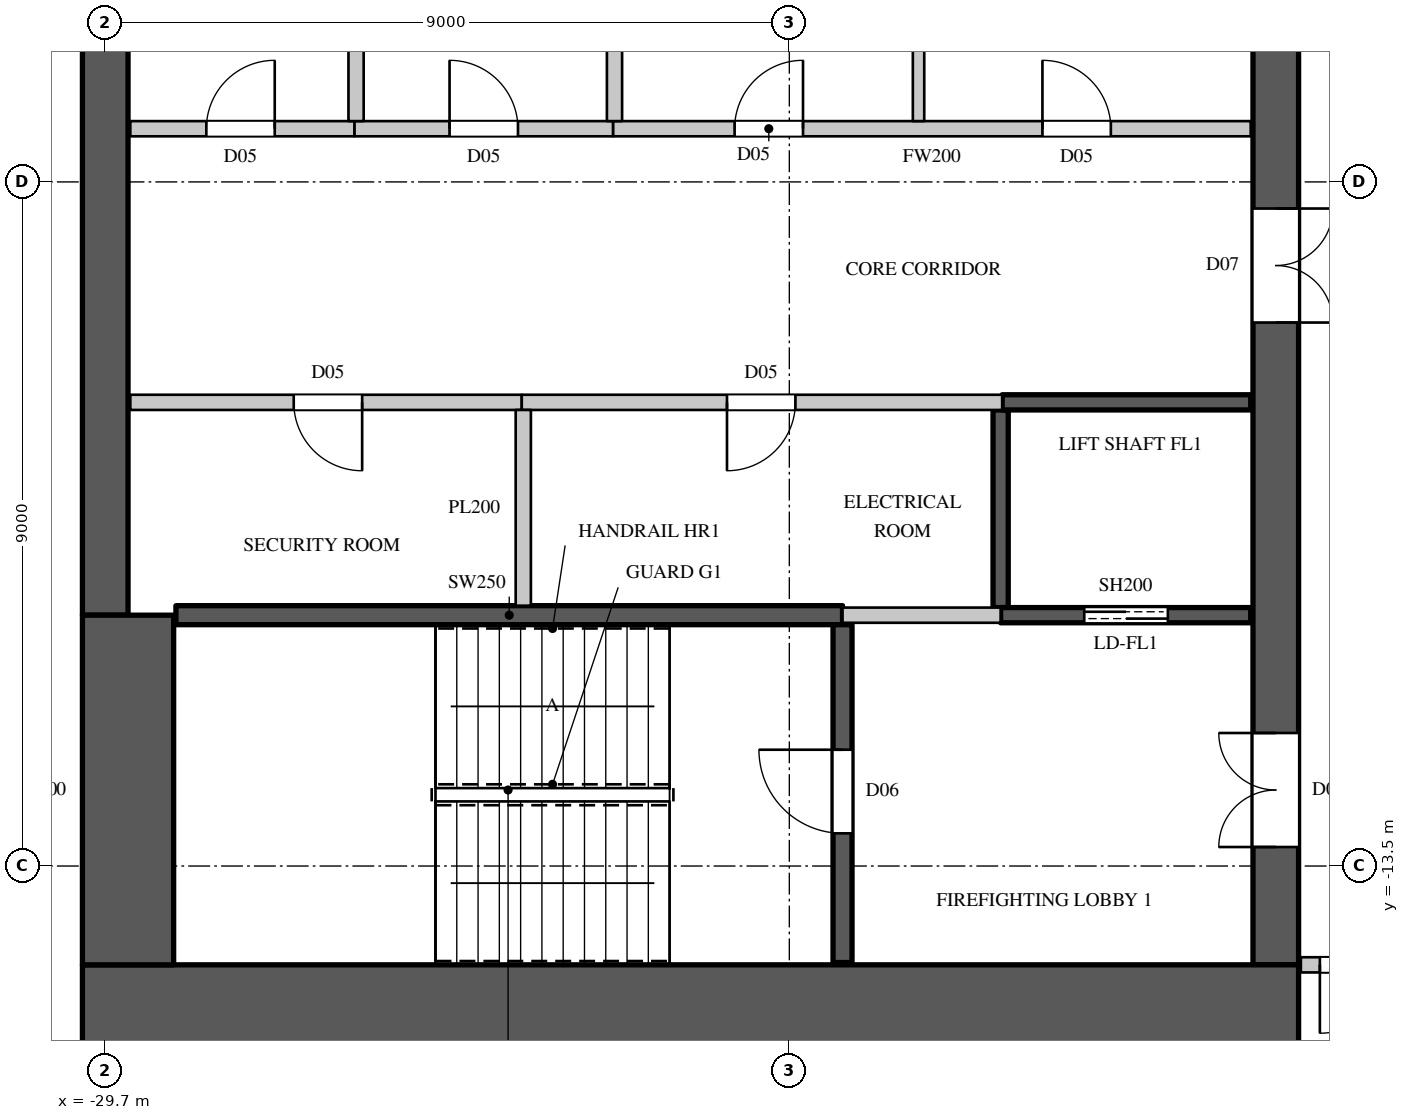
"""IFC4 building model, lengths in metres.
Left out: names, types, materials, properties, quantities, classifications, styles, units other than length and angle.
Written with IfcOpenShell. Run it as: python <this file> out.ifc"""

import sys

from ifc_helpers import new_model, si_unit, direction, frame, frame_2d, origin, place, context, subcontext, project, spatial, rectangle, extrude, element, fill, save


model = new_model("IFC4")
c1 = context("Model", 3, precision=1e-05, world=origin(), true_north=direction((0.0, 1.0)))
c2 = subcontext(c1, "Body", "Model", "MODEL_VIEW")
j1 = project(units=[si_unit("LENGTHUNIT", "METRE"), si_unit("PLANEANGLEUNIT", "RADIAN")], contexts=[c1])
p1 = place(None, origin())
s1 = spatial("IfcSite", under=j1, at=p1, CompositionType="ELEMENT")
p2 = place(p1, origin())
s2 = spatial("IfcBuilding", under=s1, at=p2, CompositionType="ELEMENT")
p3 = place(p2, frame((0.0, 0.0, 343.0)))
s3 = spatial("IfcBuildingStorey", under=s2, at=p3, CompositionType="ELEMENT", Elevation=343.0)
p4 = place(p3, frame((-30.0, -15.4, 0.0), z_axis=(0.0, 0.0, 1.0), x_axis=(1.0, 0.0, 0.0)))
e1 = element("IfcWall", 1, at=p4, inside=s3, PredefinedType="SHEAR", context=c2, shape_type="SweptSolid", body=[
    extrude(rectangle(XDim=16.0, YDim=1.2, at=frame_2d((8.0, 0.0))), origin(), (0.0, 0.0, 1.0), 4.0),
])
p5 = place(p3, frame((-14.3, -14.8, 0.0), z_axis=(0.0, 0.0, 1.0), x_axis=(0.0, 1.0, 0.0)))
e2 = element("IfcWall", 2, at=p5, inside=s3, PredefinedType="SHEAR", context=c2, shape_type="SweptSolid", body=[
    extrude(rectangle(XDim=29.6, YDim=0.6, at=frame_2d((14.8, 0.0))), origin(), (0.0, 0.0, 1.0), 4.0),
])
p6 = place(p5, frame((1.55, 0.0, 0.0)))
e3 = element("IfcOpeningElement", 3, at=p6, cuts=e2, PredefinedType="OPENING", context=c2, shape_type="SweptSolid", body=[
    extrude(rectangle(XDim=1.5, YDim=2.4, at=frame_2d((0.75, 1.2))), frame((0.0, 0.31, 0.0), z_axis=(0.0, -1.0, 0.0), x_axis=(1.0, 0.0, 0.0)), (0.0, 0.0, 1.0), 0.62),
])
p7 = place(p5, frame((26.55, 0.0, 0.0)))
e4 = element("IfcOpeningElement", 4, at=p7, cuts=e2, PredefinedType="OPENING", context=c2, shape_type="SweptSolid", body=[
    extrude(rectangle(XDim=1.5, YDim=2.4, at=frame_2d((0.75, 1.2))), frame((0.0, 0.31, 0.0), z_axis=(0.0, -1.0, 0.0), x_axis=(1.0, 0.0, 0.0)), (0.0, 0.0, 1.0), 0.62),
])
p8 = place(p5, frame((8.45, 0.0, 0.0)))
e5 = element("IfcOpeningElement", 5, at=p8, cuts=e2, PredefinedType="OPENING", context=c2, shape_type="SweptSolid", body=[
    extrude(rectangle(XDim=1.5, YDim=2.4, at=frame_2d((0.75, 1.2))), frame((0.0, 0.31, 0.0), z_axis=(0.0, -1.0, 0.0), x_axis=(1.0, 0.0, 0.0)), (0.0, 0.0, 1.0), 0.62),
])
p9 = place(p5, frame((19.65, 0.0, 0.0)))
e6 = element("IfcOpeningElement", 6, at=p9, cuts=e2, PredefinedType="OPENING", context=c2, shape_type="SweptSolid", body=[
    extrude(rectangle(XDim=1.5, YDim=2.4, at=frame_2d((0.75, 1.2))), frame((0.0, 0.31, 0.0), z_axis=(0.0, -1.0, 0.0), x_axis=(1.0, 0.0, 0.0)), (0.0, 0.0, 1.0), 0.62),
])
p10 = place(p5, frame((14.5, 0.0, 0.0)))
e7 = element("IfcOpeningElement", 7, at=p10, cuts=e2, PredefinedType="OPENING", context=c2, shape_type="SweptSolid", body=[
    extrude(rectangle(XDim=0.6, YDim=2.0, at=frame_2d((0.3, 1.0))), frame((0.0, 0.31, 0.0), z_axis=(0.0, -1.0, 0.0), x_axis=(1.0, 0.0, 0.0)), (0.0, 0.0, 1.0), 0.62),
])
p11 = place(p3, frame((-29.7, -10.2, 0.0), z_axis=(0.0, 0.0, 1.0), x_axis=(0.0, 1.0, 0.0)))
e8 = element("IfcWall", 8, at=p11, inside=s3, PredefinedType="SHEAR", context=c2, shape_type="SweptSolid", body=[
    extrude(rectangle(XDim=20.4, YDim=0.6, at=frame_2d((10.2, 0.0))), origin(), (0.0, 0.0, 1.0), 4.0),
])
p12 = place(p3, frame((-29.4, -14.8, 0.0), z_axis=(0.0, 0.0, 1.0), x_axis=(0.0, 1.0, 0.0)))
e9 = element("IfcWall", 9, at=p12, inside=s3, PredefinedType="SHEAR", context=c2, shape_type="SweptSolid", body=[
    extrude(rectangle(XDim=4.6, YDim=1.2, at=frame_2d((2.3, 0.0))), origin(), (0.0, 0.0, 1.0), 4.0),
])
p13 = place(p3, frame((-29.37, -7.4, 0.0), z_axis=(0.0, 0.0, 1.0), x_axis=(1.0, 0.0, 0.0)))
e10 = element("IfcWall", 10, at=p13, inside=s3, PredefinedType="PARTITIONING", context=c2, shape_type="SweptSolid", body=[
    extrude(rectangle(XDim=5.15, YDim=0.2, at=frame_2d((2.575, 0.0))), origin(), (0.0, 0.0, 1.0), 3.598),
])
p14 = place(p13, frame((2.15, 0.0, 0.0)))
e11 = element("IfcOpeningElement", 11, at=p14, cuts=e10, PredefinedType="OPENING", context=c2, shape_type="SweptSolid", body=[
    extrude(rectangle(XDim=0.9, YDim=2.2, at=frame_2d((0.45, 1.1))), frame((0.0, 0.11, 0.0), z_axis=(0.0, -1.0, 0.0), x_axis=(1.0, 0.0, 0.0)), (0.0, 0.0, 1.0), 0.22),
])
p15 = place(p3, frame((-29.37, -3.8, 0.0), z_axis=(0.0, 0.0, 1.0), x_axis=(1.0, 0.0, 0.0)))
e12 = element("IfcWall", 12, at=p15, inside=s3, PredefinedType="PARTITIONING", context=c2, shape_type="SweptSolid", body=[
    extrude(rectangle(XDim=2.95, YDim=0.2, at=frame_2d((1.475, 0.0))), origin(), (0.0, 0.0, 1.0), 3.598),
])
p16 = place(p15, frame((1.0, 0.0, 0.0)))
e13 = element("IfcOpeningElement", 13, at=p16, cuts=e12, PredefinedType="OPENING", context=c2, shape_type="SweptSolid", body=[
    extrude(rectangle(XDim=0.9, YDim=2.2, at=frame_2d((0.45, 1.1))), frame((0.0, 0.11, 0.0), z_axis=(0.0, -1.0, 0.0), x_axis=(1.0, 0.0, 0.0)), (0.0, 0.0, 1.0), 0.22),
])
p17 = place(p3, frame((-23.02, -3.8, 0.0), z_axis=(0.0, 0.0, 1.0), x_axis=(1.0, 0.0, 0.0)))
e14 = element("IfcWall", 14, at=p17, inside=s3, PredefinedType="PARTITIONING", context=c2, shape_type="SweptSolid", body=[
    extrude(rectangle(XDim=8.39, YDim=0.2, at=frame_2d((4.195, 0.0))), origin(), (0.0, 0.0, 1.0), 3.598),
])
p18 = place(p17, frame((1.6, 0.0, 0.0)))
e15 = element("IfcOpeningElement", 15, at=p18, cuts=e14, PredefinedType="OPENING", context=c2, shape_type="SweptSolid", body=[
    extrude(rectangle(XDim=0.9, YDim=2.2, at=frame_2d((0.45, 1.1))), frame((0.0, 0.11, 0.0), z_axis=(0.0, -1.0, 0.0), x_axis=(1.0, 0.0, 0.0)), (0.0, 0.0, 1.0), 0.22),
])
p19 = place(p17, frame((5.65, 0.0, 0.0)))
e16 = element("IfcOpeningElement", 16, at=p19, cuts=e14, PredefinedType="OPENING", context=c2, shape_type="SweptSolid", body=[
    extrude(rectangle(XDim=0.9, YDim=2.2, at=frame_2d((0.45, 1.1))), frame((0.0, 0.11, 0.0), z_axis=(0.0, -1.0, 0.0), x_axis=(1.0, 0.0, 0.0)), (0.0, 0.0, 1.0), 0.22),
])
p20 = place(p3, frame((-19.0, -3.7, 0.0), z_axis=(0.0, 0.0, 1.0), x_axis=(0.0, 1.0, 0.0)))
e17 = element("IfcWall", 17, at=p20, inside=s3, PredefinedType="PARTITIONING", context=c2, shape_type="SweptSolid", body=[
    extrude(rectangle(XDim=2.6, YDim=0.15, at=frame_2d((1.3, 0.0))), origin(), (0.0, 0.0, 1.0), 3.598),
])
p21 = place(p3, frame((-26.42, -3.8, 0.0), z_axis=(0.0, 0.0, 1.0), x_axis=(1.0, 0.0, 0.0)))
e18 = element("IfcWall", 18, at=p21, inside=s3, PredefinedType="PARTITIONING", context=c2, shape_type="SweptSolid", body=[
    extrude(rectangle(XDim=3.4, YDim=0.2, at=frame_2d((1.7, 0.0))), origin(), (0.0, 0.0, 1.0), 3.598),
])
p22 = place(p21, frame((1.25, 0.0, 0.0)))
e19 = element("IfcOpeningElement", 19, at=p22, cuts=e18, PredefinedType="OPENING", context=c2, shape_type="SweptSolid", body=[
    extrude(rectangle(XDim=0.9, YDim=2.2, at=frame_2d((0.45, 1.1))), frame((0.0, 0.11, 0.0), z_axis=(0.0, -1.0, 0.0), x_axis=(1.0, 0.0, 0.0)), (0.0, 0.0, 1.0), 0.22),
])
p23 = place(p3, frame((-26.4, -3.7, 0.0), z_axis=(0.0, 0.0, 1.0), x_axis=(0.0, 1.0, 0.0)))
e20 = element("IfcWall", 20, at=p23, inside=s3, PredefinedType="PARTITIONING", context=c2, shape_type="SweptSolid", body=[
    extrude(rectangle(XDim=2.6, YDim=0.2, at=frame_2d((1.3, 0.0))), origin(), (0.0, 0.0, 1.0), 3.598),
])
p24 = place(p3, frame((-24.22, -7.4, 0.0), z_axis=(0.0, 0.0, 1.0), x_axis=(1.0, 0.0, 0.0)))
e21 = element("IfcWall", 21, at=p24, inside=s3, PredefinedType="PARTITIONING", context=c2, shape_type="SweptSolid", body=[
    extrude(rectangle(XDim=6.32, YDim=0.2, at=frame_2d((3.16, 0.0))), origin(), (0.0, 0.0, 1.0), 3.598),
])
p25 = place(p24, frame((2.7, 0.0, 0.0)))
e22 = element("IfcOpeningElement", 22, at=p25, cuts=e21, PredefinedType="OPENING", context=c2, shape_type="SweptSolid", body=[
    extrude(rectangle(XDim=0.9, YDim=2.2, at=frame_2d((0.45, 1.1))), frame((0.0, 0.11, 0.0), z_axis=(0.0, -1.0, 0.0), x_axis=(1.0, 0.0, 0.0)), (0.0, 0.0, 1.0), 0.22),
])
p26 = place(p3, frame((-24.2, -10.075, 0.0), z_axis=(0.0, 0.0, 1.0), x_axis=(0.0, 1.0, 0.0)))
e23 = element("IfcWall", 23, at=p26, inside=s3, PredefinedType="PARTITIONING", context=c2, shape_type="SweptSolid", body=[
    extrude(rectangle(XDim=2.575, YDim=0.2, at=frame_2d((1.288, 0.0))), origin(), (0.0, 0.0, 1.0), 3.598),
])
p27 = place(p3, frame((-23.0, -3.7, 0.0), z_axis=(0.0, 0.0, 1.0), x_axis=(0.0, 1.0, 0.0)))
e24 = element("IfcWall", 24, at=p27, inside=s3, PredefinedType="PARTITIONING", context=c2, shape_type="SweptSolid", body=[
    extrude(rectangle(XDim=2.6, YDim=0.2, at=frame_2d((1.3, 0.0))), origin(), (0.0, 0.0, 1.0), 3.598),
])
p28 = place(p3, frame((-20.0, -10.2, 0.0), z_axis=(0.0, 0.0, 1.0), x_axis=(1.0, 0.0, 0.0)))
e25 = element("IfcWall", 25, at=p28, inside=s3, PredefinedType="PARTITIONING", context=c2, shape_type="SweptSolid", body=[
    extrude(rectangle(XDim=2.08, YDim=0.2, at=frame_2d((1.04, 0.0))), origin(), (0.0, 0.0, 1.0), 3.598),
])
p29 = place(p3, frame((-13.97, -14.8, 0.0), z_axis=(0.0, 0.0, 1.0), x_axis=(1.0, 0.0, 0.0)))
e26 = element("IfcWall", 26, at=p29, inside=s3, PredefinedType="PARTITIONING", context=c2, shape_type="SweptSolid", body=[
    extrude(rectangle(XDim=2.27, YDim=0.2, at=frame_2d((1.135, 0.0))), origin(), (0.0, 0.0, 1.0), 3.598),
])
p30 = place(p29, frame((0.25, 0.0, 0.0)))
e27 = element("IfcOpeningElement", 27, at=p30, cuts=e26, PredefinedType="OPENING", context=c2, shape_type="SweptSolid", body=[
    extrude(rectangle(XDim=1.8, YDim=2.4, at=frame_2d((0.9, 1.2))), frame((0.0, 0.11, 0.0), z_axis=(0.0, -1.0, 0.0), x_axis=(1.0, 0.0, 0.0)), (0.0, 0.0, 1.0), 0.22),
])
p31 = place(p3, frame((-17.92, -10.1, 0.0), z_axis=(0.0, 0.0, 1.0), x_axis=(0.0, 1.0, 0.0)))
e28 = element("IfcWall", 28, at=p31, inside=s3, PredefinedType="SHEAR", context=c2, shape_type="SweptSolid", body=[
    extrude(rectangle(XDim=2.6, YDim=0.2, at=frame_2d((1.3, 0.0))), origin(), (0.0, 0.0, 1.0), 3.598),
])
p32 = place(p3, frame((-17.92, -10.2, 0.0), z_axis=(0.0, 0.0, 1.0), x_axis=(1.0, 0.0, 0.0)))
e29 = element("IfcWall", 29, at=p32, inside=s3, PredefinedType="SHEAR", context=c2, shape_type="SweptSolid", body=[
    extrude(rectangle(XDim=3.29, YDim=0.2, at=frame_2d((1.645, 0.0))), origin(), (0.0, 0.0, 1.0), 3.598),
])
p33 = place(p32, frame((1.1, 0.0, 0.0)))
e30 = element("IfcOpeningElement", 30, at=p33, cuts=e29, PredefinedType="OPENING", context=c2, shape_type="SweptSolid", body=[
    extrude(rectangle(XDim=1.1, YDim=2.2, at=frame_2d((0.55, 1.1))), frame((0.0, 0.11, 0.0), z_axis=(0.0, -1.0, 0.0), x_axis=(1.0, 0.0, 0.0)), (0.0, 0.0, 1.0), 0.22),
])
p34 = place(p3, frame((-17.9, -7.4, 0.0), z_axis=(0.0, 0.0, 1.0), x_axis=(1.0, 0.0, 0.0)))
e31 = element("IfcWall", 31, at=p34, inside=s3, PredefinedType="SHEAR", context=c2, shape_type="SweptSolid", body=[
    extrude(rectangle(XDim=3.27, YDim=0.2, at=frame_2d((1.635, 0.0))), origin(), (0.0, 0.0, 1.0), 3.598),
])
p35 = place(p3, frame((-28.77, -10.2, 0.0), z_axis=(0.0, 0.0, 1.0), x_axis=(1.0, 0.0, 0.0)))
e32 = element("IfcWall", 32, at=p35, inside=s3, PredefinedType="SHEAR", context=c2, shape_type="SweptSolid", body=[
    extrude(rectangle(XDim=8.77, YDim=0.25, at=frame_2d((4.385, 0.0))), origin(), (0.0, 0.0, 1.0), 3.598),
])
p36 = place(p3, frame((-20.0, -14.77, 0.0), z_axis=(0.0, 0.0, 1.0), x_axis=(0.0, 1.0, 0.0)))
e33 = element("IfcWall", 33, at=p36, inside=s3, PredefinedType="SHEAR", context=c2, shape_type="SweptSolid", body=[
    extrude(rectangle(XDim=4.445, YDim=0.25, at=frame_2d((2.223, 0.0))), origin(), (0.0, 0.0, 1.0), 3.598),
])
p37 = place(p36, frame((1.7, 0.0, 0.0)))
e34 = element("IfcOpeningElement", 34, at=p37, cuts=e33, PredefinedType="OPENING", context=c2, shape_type="SweptSolid", body=[
    extrude(rectangle(XDim=1.1, YDim=2.2, at=frame_2d((0.55, 1.1))), frame((0.0, 0.135, 0.0), z_axis=(0.0, -1.0, 0.0), x_axis=(1.0, 0.0, 0.0)), (0.0, 0.0, 1.0), 0.27),
])
p38 = place(p37, origin())
e35 = element("IfcDoor", 35, at=p38, inside=s3, OperationType="SINGLE_SWING_RIGHT", PredefinedType="DOOR", context=c2, shape_type="SweptSolid", body=[
    extrude(rectangle(XDim=1.1, YDim=2.2, at=frame_2d((0.55, 1.1))), frame((0.0, 0.025, 0.0), z_axis=(0.0, -1.0, 0.0), x_axis=(1.0, 0.0, 0.0)), (0.0, 0.0, 1.0), 0.05),
])
fill(e34, e35)
p39 = place(p14, origin())
e36 = element("IfcDoor", 36, at=p39, inside=s3, OperationType="SINGLE_SWING_LEFT", PredefinedType="DOOR", context=c2, shape_type="SweptSolid", body=[
    extrude(rectangle(XDim=0.9, YDim=2.2, at=frame_2d((0.45, 1.1))), frame((0.0, 0.025, 0.0), z_axis=(0.0, -1.0, 0.0), x_axis=(1.0, 0.0, 0.0)), (0.0, 0.0, 1.0), 0.05),
])
fill(e11, e36)
p40 = place(p25, origin())
e37 = element("IfcDoor", 37, at=p40, inside=s3, OperationType="SINGLE_SWING_RIGHT", PredefinedType="DOOR", context=c2, shape_type="SweptSolid", body=[
    extrude(rectangle(XDim=0.9, YDim=2.2, at=frame_2d((0.45, 1.1))), frame((0.0, 0.025, 0.0), z_axis=(0.0, -1.0, 0.0), x_axis=(1.0, 0.0, 0.0)), (0.0, 0.0, 1.0), 0.05),
])
fill(e22, e37)
p41 = place(p16, origin())
e38 = element("IfcDoor", 38, at=p41, inside=s3, OperationType="SINGLE_SWING_RIGHT", PredefinedType="DOOR", context=c2, shape_type="SweptSolid", body=[
    extrude(rectangle(XDim=0.9, YDim=2.2, at=frame_2d((0.45, 1.1))), frame((0.0, 0.025, 0.0), z_axis=(0.0, -1.0, 0.0), x_axis=(1.0, 0.0, 0.0)), (0.0, 0.0, 1.0), 0.05),
])
fill(e13, e38)
p42 = place(p22, origin())
e39 = element("IfcDoor", 39, at=p42, inside=s3, OperationType="SINGLE_SWING_LEFT", PredefinedType="DOOR", context=c2, shape_type="SweptSolid", body=[
    extrude(rectangle(XDim=0.9, YDim=2.2, at=frame_2d((0.45, 1.1))), frame((0.0, 0.025, 0.0), z_axis=(0.0, -1.0, 0.0), x_axis=(1.0, 0.0, 0.0)), (0.0, 0.0, 1.0), 0.05),
])
fill(e19, e39)
p43 = place(p18, origin())
e40 = element("IfcDoor", 40, at=p43, inside=s3, OperationType="SINGLE_SWING_RIGHT", PredefinedType="DOOR", context=c2, shape_type="SweptSolid", body=[
    extrude(rectangle(XDim=0.9, YDim=2.2, at=frame_2d((0.45, 1.1))), frame((0.0, 0.025, 0.0), z_axis=(0.0, -1.0, 0.0), x_axis=(1.0, 0.0, 0.0)), (0.0, 0.0, 1.0), 0.05),
])
fill(e15, e40)
p44 = place(p19, origin())
e41 = element("IfcDoor", 41, at=p44, inside=s3, OperationType="SINGLE_SWING_LEFT", PredefinedType="DOOR", context=c2, shape_type="SweptSolid", body=[
    extrude(rectangle(XDim=0.9, YDim=2.2, at=frame_2d((0.45, 1.1))), frame((0.0, 0.025, 0.0), z_axis=(0.0, -1.0, 0.0), x_axis=(1.0, 0.0, 0.0)), (0.0, 0.0, 1.0), 0.05),
])
fill(e16, e41)
p45 = place(p33, origin())
e42 = element("IfcDoor", 42, at=p45, inside=s3, OperationType="DOUBLE_DOOR_SLIDING", PredefinedType="DOOR", context=c2, shape_type="SweptSolid", body=[
    extrude(rectangle(XDim=1.1, YDim=2.2, at=frame_2d((0.55, 1.1))), frame((0.0, 0.025, 0.0), z_axis=(0.0, -1.0, 0.0), x_axis=(1.0, 0.0, 0.0)), (0.0, 0.0, 1.0), 0.05),
])
fill(e30, e42)
p46 = place(p30, origin())
e43 = element("IfcDoor", 43, at=p46, inside=s3, OperationType="DOUBLE_DOOR_SINGLE_SWING", PredefinedType="DOOR", context=c2, shape_type="SweptSolid", body=[
    extrude(rectangle(XDim=1.8, YDim=2.4, at=frame_2d((0.9, 1.2))), frame((0.0, 0.025, 0.0), z_axis=(0.0, -1.0, 0.0), x_axis=(1.0, 0.0, 0.0)), (0.0, 0.0, 1.0), 0.05),
])
fill(e27, e43)
p47 = place(p6, origin())
e44 = element("IfcDoor", 44, at=p47, inside=s3, OperationType="DOUBLE_DOOR_SINGLE_SWING", PredefinedType="DOOR", context=c2, shape_type="SweptSolid", body=[
    extrude(rectangle(XDim=1.5, YDim=2.4, at=frame_2d((0.75, 1.2))), frame((0.0, 0.295, 0.0), z_axis=(0.0, -1.0, 0.0), x_axis=(1.0, 0.0, 0.0)), (0.0, 0.0, 1.0), 0.05),
])
fill(e3, e44)
p48 = place(p8, origin())
e45 = element("IfcDoor", 45, at=p48, inside=s3, OperationType="DOUBLE_DOOR_SINGLE_SWING", PredefinedType="DOOR", context=c2, shape_type="SweptSolid", body=[
    extrude(rectangle(XDim=1.5, YDim=2.4, at=frame_2d((0.75, 1.2))), frame((0.0, -0.245, 0.0), z_axis=(0.0, -1.0, 0.0), x_axis=(1.0, 0.0, 0.0)), (0.0, 0.0, 1.0), 0.05),
])
fill(e5, e45)
save(model, sys.argv[1])
